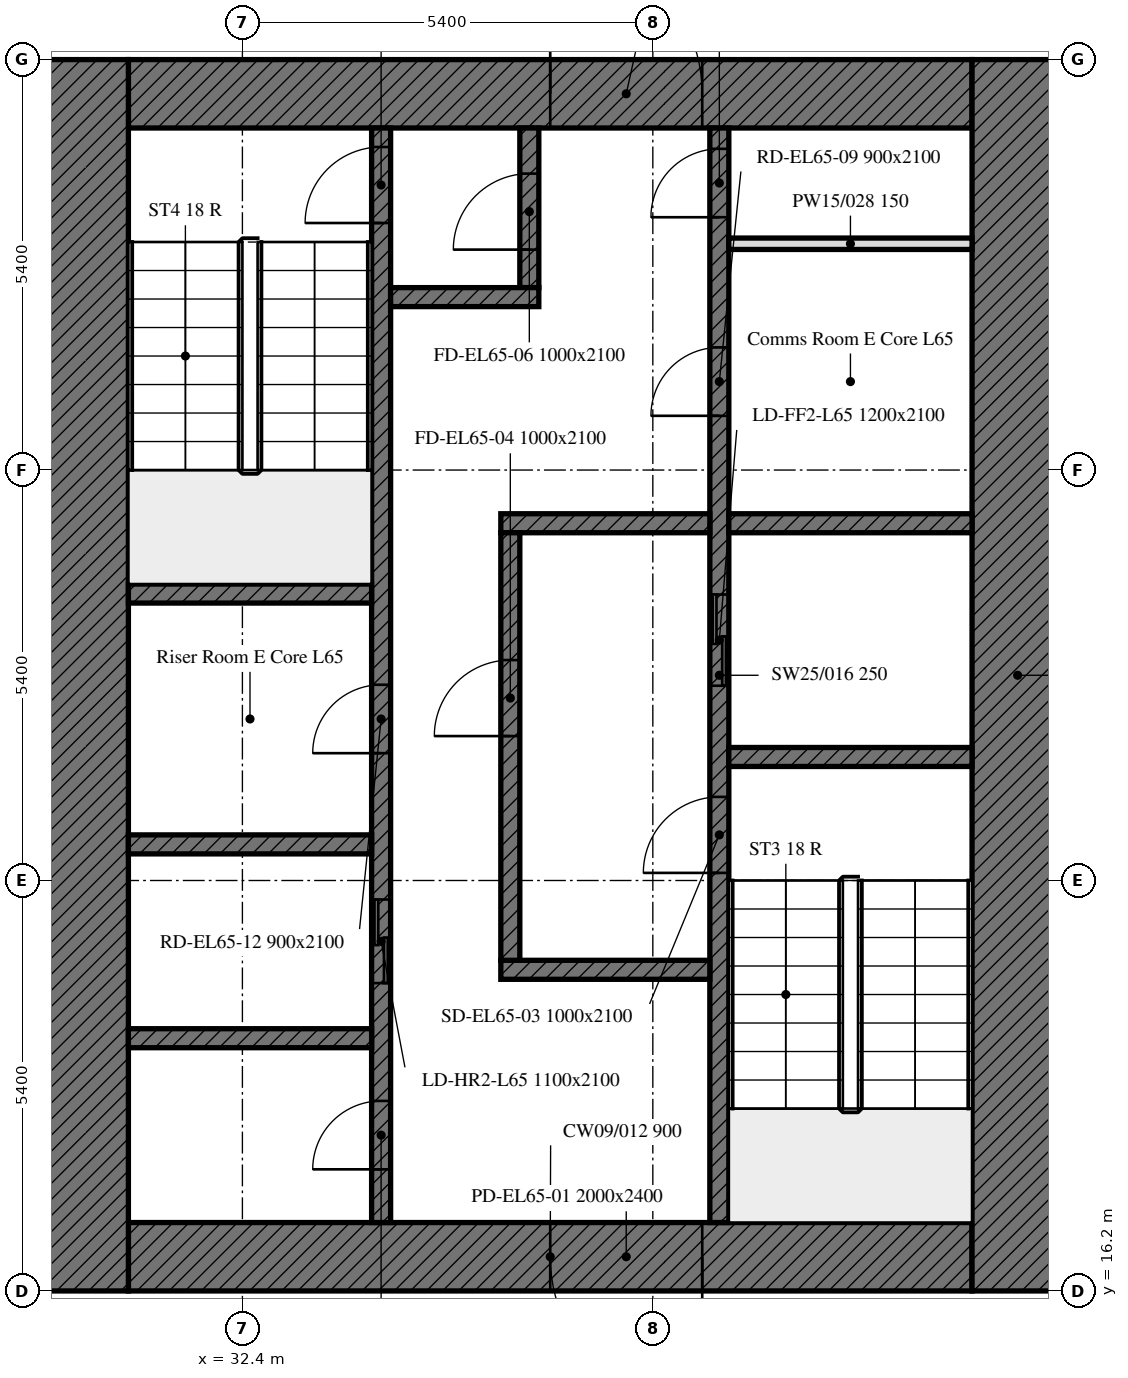
"""IFC4 building model, lengths in metres.
Left out: names, types, materials, properties, quantities, classifications, styles, units other than length and angle.
Written with IfcOpenShell. Run it as: python <this file> out.ifc"""

import sys

from ifc_helpers import new_model, si_unit, direction, frame, frame_2d, origin, place, context, subcontext, project, spatial, rectangle, extrude, element, fill, save


model = new_model("IFC4")
c1 = context("Model", 3, precision=1e-05, world=origin(), true_north=direction((0.0, 1.0)))
c2 = subcontext(c1, "Body", "Model", "MODEL_VIEW")
j1 = project(units=[si_unit("LENGTHUNIT", "METRE"), si_unit("PLANEANGLEUNIT", "RADIAN")], contexts=[c1])
p1 = place(None, origin())
s1 = spatial("IfcSite", under=j1, at=p1, CompositionType="ELEMENT")
p2 = place(p1, origin())
s2 = spatial("IfcBuilding", under=s1, at=p2, CompositionType="ELEMENT")
p3 = place(p2, frame((0.0, 0.0, 268.6)))
s3 = spatial("IfcBuildingStorey", under=s2, at=p3, CompositionType="ELEMENT", Elevation=268.6)
p4 = place(p3, frame((42.0, 16.65, 0.0), z_axis=(0.0, 0.0, 1.0), x_axis=(-1.0, 0.0, 0.0)))
e1 = element("IfcWall", 1, at=p4, inside=s3, PredefinedType="SOLIDWALL", context=c2, shape_type="SweptSolid", body=[
    extrude(rectangle(XDim=11.1, YDim=0.9, at=frame_2d((5.55, 0.0))), origin(), (0.0, 0.0, 1.0), 3.0),
])
p5 = place(p4, frame((3.55, 0.0, 0.0)))
e2 = element("IfcOpeningElement", 2, at=p5, cuts=e1, PredefinedType="OPENING", context=c2, shape_type="SweptSolid", body=[
    extrude(rectangle(XDim=2.0, YDim=2.4, at=frame_2d((1.0, 1.2))), frame((0.0, 0.45, 0.0), z_axis=(0.0, -1.0, 0.0), x_axis=(1.0, 0.0, 0.0)), (0.0, 0.0, 1.0), 0.9),
])
p6 = place(p3, frame((30.9, 31.95, 0.0), z_axis=(0.0, 0.0, 1.0), x_axis=(1.0, 0.0, 0.0)))
e3 = element("IfcWall", 3, at=p6, inside=s3, PredefinedType="SOLIDWALL", context=c2, shape_type="SweptSolid", body=[
    extrude(rectangle(XDim=11.1, YDim=0.9, at=frame_2d((5.55, 0.0))), origin(), (0.0, 0.0, 1.0), 3.0),
])
p7 = place(p6, frame((5.55, 0.0, 0.0)))
e4 = element("IfcOpeningElement", 4, at=p7, cuts=e3, PredefinedType="OPENING", context=c2, shape_type="SweptSolid", body=[
    extrude(rectangle(XDim=2.0, YDim=2.4, at=frame_2d((1.0, 1.2))), frame((0.0, 0.45, 0.0), z_axis=(0.0, -1.0, 0.0), x_axis=(1.0, 0.0, 0.0)), (0.0, 0.0, 1.0), 0.9),
])
for number, where, z_axis, x_axis in (
    (5, (42.6, 32.4, 0.0), (0.0, 0.0, 1.0), (0.0, -1.0, 0.0)),
    (6, (30.3, 16.2, 0.0), (0.0, 0.0, 1.0), (0.0, 1.0, 0.0)),
):
    element("IfcWall", number, at=place(p3, frame(where, z_axis=z_axis, x_axis=x_axis)), inside=s3, PredefinedType="SOLIDWALL", context=c2, shape_type="SweptSolid", body=[
        extrude(rectangle(XDim=16.2, YDim=1.2, at=frame_2d((8.1, 0.0))), origin(), (0.0, 0.0, 1.0), 3.0),
    ])
p8 = place(p3, frame((38.675, 17.1, 0.0), z_axis=(0.0, 0.0, 1.0), x_axis=(0.0, 1.0, 0.0)))
e7 = element("IfcWall", 7, at=p8, inside=s3, PredefinedType="SOLIDWALL", context=c2, shape_type="SweptSolid", body=[
    extrude(rectangle(XDim=14.4, YDim=0.25, at=frame_2d((7.2, 0.0))), origin(), (0.0, 0.0, 1.0), 3.0),
])
p9 = place(p8, frame((4.6, 0.0, 0.0)))
e8 = element("IfcOpeningElement", 8, at=p9, cuts=e7, PredefinedType="OPENING", context=c2, shape_type="SweptSolid", body=[
    extrude(rectangle(XDim=1.0, YDim=2.1, at=frame_2d((0.5, 1.05))), frame((0.0, 0.125, 0.0), z_axis=(0.0, -1.0, 0.0), x_axis=(1.0, 0.0, 0.0)), (0.0, 0.0, 1.0), 0.25),
])
p10 = place(p8, frame((7.062, 0.0, 0.0)))
e9 = element("IfcOpeningElement", 9, at=p10, cuts=e7, PredefinedType="OPENING", context=c2, shape_type="SweptSolid", body=[
    extrude(rectangle(XDim=1.2, YDim=2.1, at=frame_2d((0.6, 1.05))), frame((0.0, 0.125, 0.0), z_axis=(0.0, -1.0, 0.0), x_axis=(1.0, 0.0, 0.0)), (0.0, 0.0, 1.0), 0.25),
])
p11 = place(p8, frame((10.614, 0.0, 0.0)))
e10 = element("IfcOpeningElement", 10, at=p11, cuts=e7, PredefinedType="OPENING", context=c2, shape_type="SweptSolid", body=[
    extrude(rectangle(XDim=0.9, YDim=2.1, at=frame_2d((0.45, 1.05))), frame((0.0, 0.125, 0.0), z_axis=(0.0, -1.0, 0.0), x_axis=(1.0, 0.0, 0.0)), (0.0, 0.0, 1.0), 0.25),
])
p12 = place(p8, frame((13.226, 0.0, 0.0)))
e11 = element("IfcOpeningElement", 11, at=p12, cuts=e7, PredefinedType="OPENING", context=c2, shape_type="SweptSolid", body=[
    extrude(rectangle(XDim=0.9, YDim=2.1, at=frame_2d((0.45, 1.05))), frame((0.0, 0.125, 0.0), z_axis=(0.0, -1.0, 0.0), x_axis=(1.0, 0.0, 0.0)), (0.0, 0.0, 1.0), 0.25),
])
p13 = place(p3, frame((34.225, 17.1, 0.0), z_axis=(0.0, 0.0, 1.0), x_axis=(0.0, 1.0, 0.0)))
e12 = element("IfcWall", 12, at=p13, inside=s3, PredefinedType="SOLIDWALL", context=c2, shape_type="SweptSolid", body=[
    extrude(rectangle(XDim=14.4, YDim=0.25, at=frame_2d((7.2, 0.0))), origin(), (0.0, 0.0, 1.0), 3.0),
])
p14 = place(p13, frame((13.15, 0.0, 0.0)))
e13 = element("IfcOpeningElement", 13, at=p14, cuts=e12, PredefinedType="OPENING", context=c2, shape_type="SweptSolid", body=[
    extrude(rectangle(XDim=1.0, YDim=2.1, at=frame_2d((0.5, 1.05))), frame((0.0, 0.125, 0.0), z_axis=(0.0, -1.0, 0.0), x_axis=(1.0, 0.0, 0.0)), (0.0, 0.0, 1.0), 0.25),
])
p15 = place(p13, frame((3.15, 0.0, 0.0)))
e14 = element("IfcOpeningElement", 14, at=p15, cuts=e12, PredefinedType="OPENING", context=c2, shape_type="SweptSolid", body=[
    extrude(rectangle(XDim=1.1, YDim=2.1, at=frame_2d((0.55, 1.05))), frame((0.0, 0.125, 0.0), z_axis=(0.0, -1.0, 0.0), x_axis=(1.0, 0.0, 0.0)), (0.0, 0.0, 1.0), 0.25),
])
p16 = place(p13, frame((0.7, 0.0, 0.0)))
e15 = element("IfcOpeningElement", 15, at=p16, cuts=e12, PredefinedType="OPENING", context=c2, shape_type="SweptSolid", body=[
    extrude(rectangle(XDim=0.9, YDim=2.1, at=frame_2d((0.45, 1.05))), frame((0.0, 0.125, 0.0), z_axis=(0.0, -1.0, 0.0), x_axis=(1.0, 0.0, 0.0)), (0.0, 0.0, 1.0), 0.25),
])
p17 = place(p13, frame((6.175, 0.0, 0.0)))
e16 = element("IfcOpeningElement", 16, at=p17, cuts=e12, PredefinedType="OPENING", context=c2, shape_type="SweptSolid", body=[
    extrude(rectangle(XDim=0.9, YDim=2.1, at=frame_2d((0.45, 1.05))), frame((0.0, 0.125, 0.0), z_axis=(0.0, -1.0, 0.0), x_axis=(1.0, 0.0, 0.0)), (0.0, 0.0, 1.0), 0.25),
])
p18 = place(p3, frame((38.8, 23.225, 0.0), z_axis=(0.0, 0.0, 1.0), x_axis=(1.0, 0.0, 0.0)))
e17 = element("IfcWall", 17, at=p18, inside=s3, PredefinedType="SOLIDWALL", context=c2, shape_type="SweptSolid", body=[
    extrude(rectangle(XDim=3.2, YDim=0.25, at=frame_2d((1.6, 0.0))), origin(), (0.0, 0.0, 1.0), 3.0),
])
for number, where, z_axis, x_axis in (
    (18, (30.9, 25.375, 0.0), (0.0, 0.0, 1.0), (1.0, 0.0, 0.0)),
    (19, (30.9, 22.075, 0.0), (0.0, 0.0, 1.0), (1.0, 0.0, 0.0)),
):
    element("IfcWall", number, at=place(p3, frame(where, z_axis=z_axis, x_axis=x_axis)), inside=s3, PredefinedType="SOLIDWALL", context=c2, shape_type="SweptSolid", body=[
        extrude(rectangle(XDim=3.2, YDim=0.25, at=frame_2d((1.6, 0.0))), origin(), (0.0, 0.0, 1.0), 3.0),
    ])
p19 = place(p3, frame((38.8, 26.3, 0.0), z_axis=(0.0, 0.0, 1.0), x_axis=(1.0, 0.0, 0.0)))
e20 = element("IfcWall", 20, at=p19, inside=s3, PredefinedType="SOLIDWALL", context=c2, shape_type="SweptSolid", body=[
    extrude(rectangle(XDim=3.2, YDim=0.25, at=frame_2d((1.6, 0.0))), origin(), (0.0, 0.0, 1.0), 3.0),
])
for number, where, z_axis, x_axis in (
    (21, (35.8, 26.3, 0.0), (0.0, 0.0, 1.0), (1.0, 0.0, 0.0)),
    (22, (35.8, 20.425, 0.0), (0.0, 0.0, 1.0), (1.0, 0.0, 0.0)),
):
    element("IfcWall", number, at=place(p3, frame(where, z_axis=z_axis, x_axis=x_axis)), inside=s3, PredefinedType="SOLIDWALL", context=c2, shape_type="SweptSolid", body=[
        extrude(rectangle(XDim=2.75, YDim=0.25, at=frame_2d((1.375, 0.0))), origin(), (0.0, 0.0, 1.0), 3.0),
    ])
p20 = place(p3, frame((36.175, 29.4, 0.0), z_axis=(0.0, 0.0, 1.0), x_axis=(0.0, 1.0, 0.0)))
e23 = element("IfcWall", 23, at=p20, inside=s3, PredefinedType="SOLIDWALL", context=c2, shape_type="SweptSolid", body=[
    extrude(rectangle(XDim=2.1, YDim=0.25, at=frame_2d((1.05, 0.0))), origin(), (0.0, 0.0, 1.0), 3.0),
])
p21 = place(p20, frame((0.5, 0.0, 0.0)))
e24 = element("IfcOpeningElement", 24, at=p21, cuts=e23, PredefinedType="OPENING", context=c2, shape_type="SweptSolid", body=[
    extrude(rectangle(XDim=1.0, YDim=2.1, at=frame_2d((0.5, 1.05))), frame((0.0, 0.125, 0.0), z_axis=(0.0, -1.0, 0.0), x_axis=(1.0, 0.0, 0.0)), (0.0, 0.0, 1.0), 0.25),
])
p22 = place(p3, frame((34.35, 29.275, 0.0), z_axis=(0.0, 0.0, 1.0), x_axis=(1.0, 0.0, 0.0)))
e25 = element("IfcWall", 25, at=p22, inside=s3, PredefinedType="SOLIDWALL", context=c2, shape_type="SweptSolid", body=[
    extrude(rectangle(XDim=1.95, YDim=0.25, at=frame_2d((0.975, 0.0))), origin(), (0.0, 0.0, 1.0), 3.0),
])
p23 = place(p3, frame((35.925, 20.55, 0.0), z_axis=(0.0, 0.0, 1.0), x_axis=(0.0, 1.0, 0.0)))
e26 = element("IfcWall", 26, at=p23, inside=s3, PredefinedType="SOLIDWALL", context=c2, shape_type="SweptSolid", body=[
    extrude(rectangle(XDim=5.625, YDim=0.25, at=frame_2d((2.812, 0.0))), origin(), (0.0, 0.0, 1.0), 3.0),
])
p24 = place(p23, frame((2.95, 0.0, 0.0)))
e27 = element("IfcOpeningElement", 27, at=p24, cuts=e26, PredefinedType="OPENING", context=c2, shape_type="SweptSolid", body=[
    extrude(rectangle(XDim=1.0, YDim=2.1, at=frame_2d((0.5, 1.05))), frame((0.0, 0.125, 0.0), z_axis=(0.0, -1.0, 0.0), x_axis=(1.0, 0.0, 0.0)), (0.0, 0.0, 1.0), 0.25),
])
p25 = place(p3, frame((30.9, 19.525, 0.0), z_axis=(0.0, 0.0, 1.0), x_axis=(1.0, 0.0, 0.0)))
e28 = element("IfcWall", 28, at=p25, inside=s3, PredefinedType="SOLIDWALL", context=c2, shape_type="SweptSolid", body=[
    extrude(rectangle(XDim=3.2, YDim=0.25, at=frame_2d((1.6, 0.0))), origin(), (0.0, 0.0, 1.0), 3.0),
])
p26 = place(p3, frame((38.8, 29.977, 0.0), z_axis=(0.0, 0.0, 1.0), x_axis=(1.0, 0.0, 0.0)))
e29 = element("IfcWall", 29, at=p26, inside=s3, PredefinedType="PARTITIONING", context=c2, shape_type="SweptSolid", body=[
    extrude(rectangle(XDim=3.2, YDim=0.15, at=frame_2d((1.6, 0.0))), origin(), (0.0, 0.0, 1.0), 3.0),
])
p27 = place(p5, origin())
e30 = element("IfcDoor", 30, at=p27, inside=s3, OperationType="DOUBLE_DOOR_SINGLE_SWING", PredefinedType="DOOR", context=c2, shape_type="SweptSolid", body=[
    extrude(rectangle(XDim=2.0, YDim=2.4, at=frame_2d((1.0, 1.2))), frame((0.0, 0.025, 0.0), z_axis=(0.0, -1.0, 0.0), x_axis=(1.0, 0.0, 0.0)), (0.0, 0.0, 1.0), 0.05),
])
fill(e2, e30)
p28 = place(p7, origin())
e31 = element("IfcDoor", 31, at=p28, inside=s3, OperationType="DOUBLE_DOOR_SINGLE_SWING", PredefinedType="DOOR", context=c2, shape_type="SweptSolid", body=[
    extrude(rectangle(XDim=2.0, YDim=2.4, at=frame_2d((1.0, 1.2))), frame((0.0, 0.025, 0.0), z_axis=(0.0, -1.0, 0.0), x_axis=(1.0, 0.0, 0.0)), (0.0, 0.0, 1.0), 0.05),
])
fill(e4, e31)
p29 = place(p9, origin())
e32 = element("IfcDoor", 32, at=p29, inside=s3, OperationType="SINGLE_SWING_LEFT", PredefinedType="DOOR", context=c2, shape_type="SweptSolid", body=[
    extrude(rectangle(XDim=1.0, YDim=2.1, at=frame_2d((0.5, 1.05))), frame((0.0, 0.025, 0.0), z_axis=(0.0, -1.0, 0.0), x_axis=(1.0, 0.0, 0.0)), (0.0, 0.0, 1.0), 0.05),
])
fill(e8, e32)
p30 = place(p24, origin())
e33 = element("IfcDoor", 33, at=p30, inside=s3, OperationType="SINGLE_SWING_LEFT", PredefinedType="DOOR", context=c2, shape_type="SweptSolid", body=[
    extrude(rectangle(XDim=1.0, YDim=2.1, at=frame_2d((0.5, 1.05))), frame((0.0, 0.025, 0.0), z_axis=(0.0, -1.0, 0.0), x_axis=(1.0, 0.0, 0.0)), (0.0, 0.0, 1.0), 0.05),
])
fill(e27, e33)
p31 = place(p14, origin())
e34 = element("IfcDoor", 34, at=p31, inside=s3, OperationType="SINGLE_SWING_LEFT", PredefinedType="DOOR", context=c2, shape_type="SweptSolid", body=[
    extrude(rectangle(XDim=1.0, YDim=2.1, at=frame_2d((0.5, 1.05))), frame((0.0, 0.025, 0.0), z_axis=(0.0, -1.0, 0.0), x_axis=(1.0, 0.0, 0.0)), (0.0, 0.0, 1.0), 0.05),
])
fill(e13, e34)
p32 = place(p21, origin())
e35 = element("IfcDoor", 35, at=p32, inside=s3, OperationType="SINGLE_SWING_LEFT", PredefinedType="DOOR", context=c2, shape_type="SweptSolid", body=[
    extrude(rectangle(XDim=1.0, YDim=2.1, at=frame_2d((0.5, 1.05))), frame((0.0, 0.025, 0.0), z_axis=(0.0, -1.0, 0.0), x_axis=(1.0, 0.0, 0.0)), (0.0, 0.0, 1.0), 0.05),
])
fill(e24, e35)
p33 = place(p10, origin())
e36 = element("IfcDoor", 36, at=p33, inside=s3, OperationType="DOUBLE_DOOR_SLIDING", PredefinedType="DOOR", context=c2, shape_type="SweptSolid", body=[
    extrude(rectangle(XDim=1.2, YDim=2.1, at=frame_2d((0.6, 1.05))), frame((0.0, 0.025, 0.0), z_axis=(0.0, -1.0, 0.0), x_axis=(1.0, 0.0, 0.0)), (0.0, 0.0, 1.0), 0.05),
])
fill(e9, e36)
p34 = place(p15, origin())
e37 = element("IfcDoor", 37, at=p34, inside=s3, OperationType="DOUBLE_DOOR_SLIDING", PredefinedType="DOOR", context=c2, shape_type="SweptSolid", body=[
    extrude(rectangle(XDim=1.1, YDim=2.1, at=frame_2d((0.55, 1.05))), frame((0.0, 0.025, 0.0), z_axis=(0.0, -1.0, 0.0), x_axis=(1.0, 0.0, 0.0)), (0.0, 0.0, 1.0), 0.05),
])
fill(e14, e37)
p35 = place(p11, origin())
e38 = element("IfcDoor", 38, at=p35, inside=s3, OperationType="SINGLE_SWING_LEFT", PredefinedType="DOOR", context=c2, shape_type="SweptSolid", body=[
    extrude(rectangle(XDim=0.9, YDim=2.1, at=frame_2d((0.45, 1.05))), frame((0.0, 0.025, 0.0), z_axis=(0.0, -1.0, 0.0), x_axis=(1.0, 0.0, 0.0)), (0.0, 0.0, 1.0), 0.05),
])
fill(e10, e38)
p36 = place(p12, origin())
e39 = element("IfcDoor", 39, at=p36, inside=s3, OperationType="SINGLE_SWING_LEFT", PredefinedType="DOOR", context=c2, shape_type="SweptSolid", body=[
    extrude(rectangle(XDim=0.9, YDim=2.1, at=frame_2d((0.45, 1.05))), frame((0.0, 0.025, 0.0), z_axis=(0.0, -1.0, 0.0), x_axis=(1.0, 0.0, 0.0)), (0.0, 0.0, 1.0), 0.05),
])
fill(e11, e39)
p37 = place(p16, origin())
e40 = element("IfcDoor", 40, at=p37, inside=s3, OperationType="SINGLE_SWING_LEFT", PredefinedType="DOOR", context=c2, shape_type="SweptSolid", body=[
    extrude(rectangle(XDim=0.9, YDim=2.1, at=frame_2d((0.45, 1.05))), frame((0.0, 0.025, 0.0), z_axis=(0.0, -1.0, 0.0), x_axis=(1.0, 0.0, 0.0)), (0.0, 0.0, 1.0), 0.05),
])
fill(e15, e40)
p38 = place(p17, origin())
e41 = element("IfcDoor", 41, at=p38, inside=s3, OperationType="SINGLE_SWING_LEFT", PredefinedType="DOOR", context=c2, shape_type="SweptSolid", body=[
    extrude(rectangle(XDim=0.9, YDim=2.1, at=frame_2d((0.45, 1.05))), frame((0.0, 0.025, 0.0), z_axis=(0.0, -1.0, 0.0), x_axis=(1.0, 0.0, 0.0)), (0.0, 0.0, 1.0), 0.05),
])
fill(e16, e41)
save(model, sys.argv[1])
